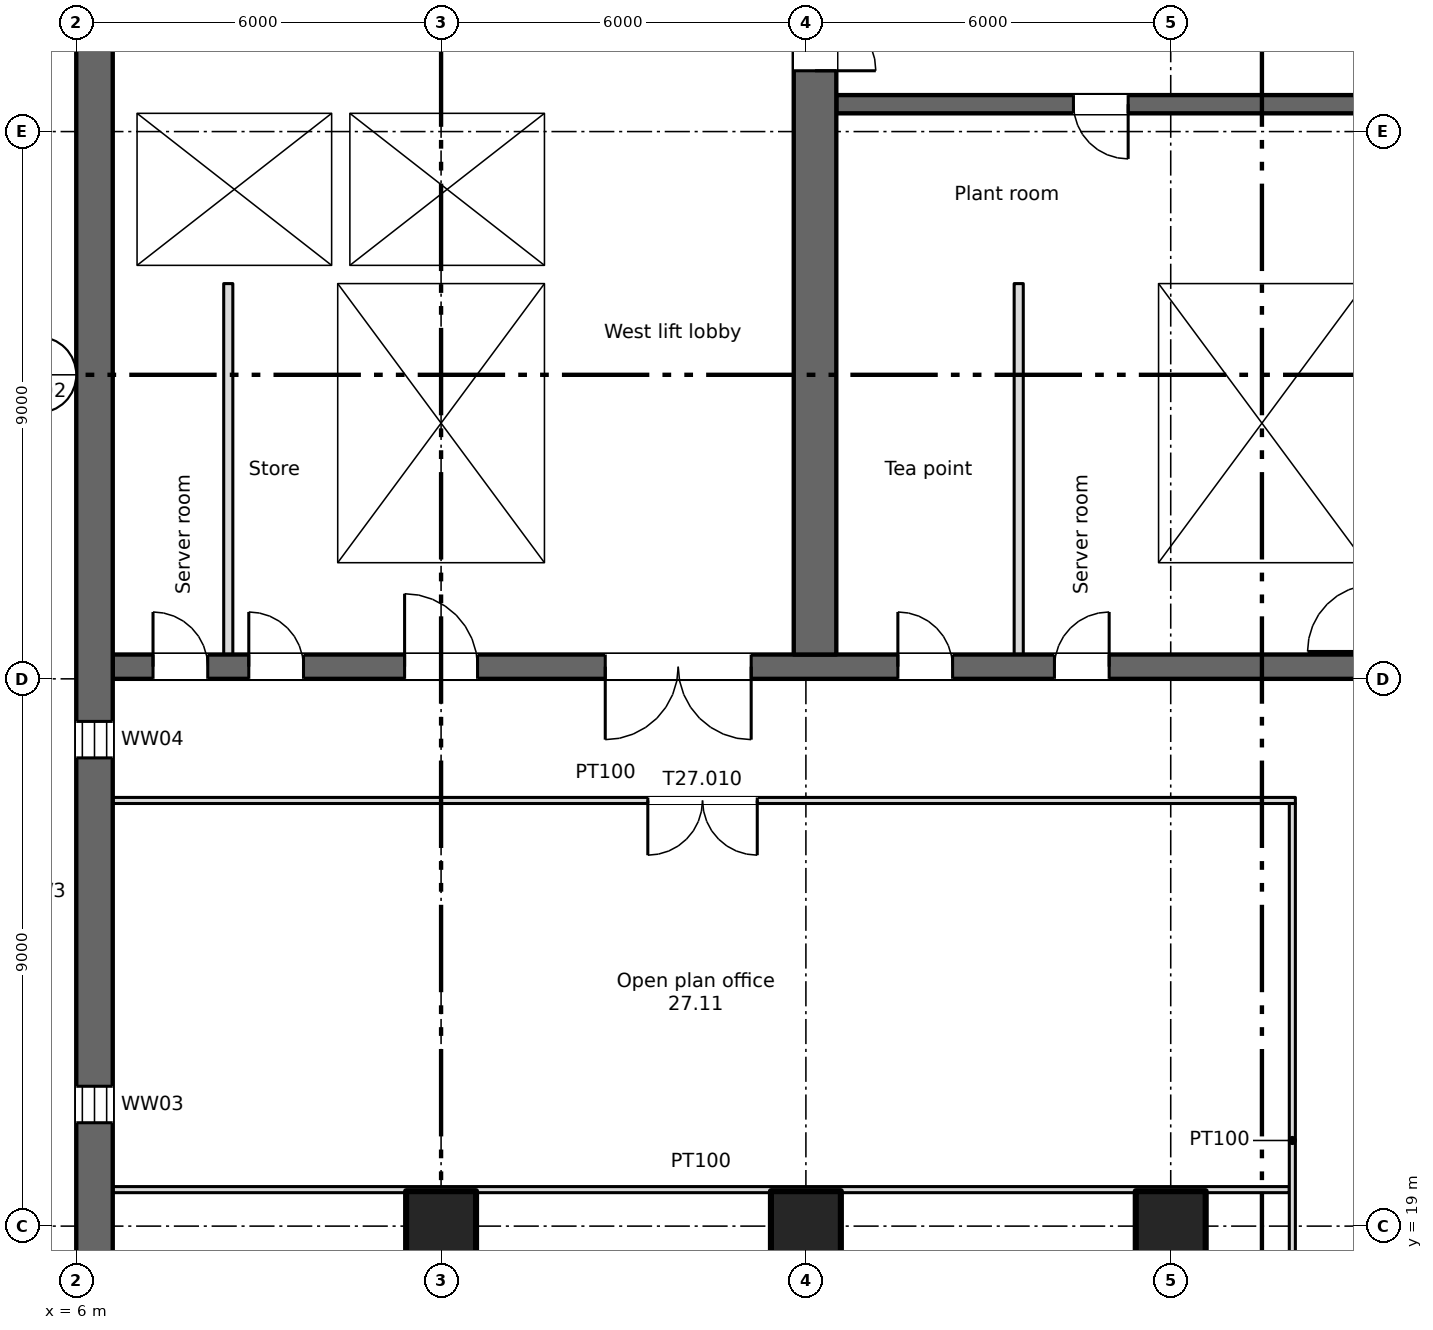
"""IFC4 building model, lengths in metres.
Left out: names, types, materials, properties, quantities, classifications, styles, units other than length and angle.
Written with IfcOpenShell. Run it as: python <this file> out.ifc"""

import sys

from ifc_helpers import new_model, si_unit, direction, frame, frame_2d, origin, origin_2d, place, context, subcontext, project, spatial, rectangle, extrude, element, fill, save


model = new_model("IFC4")
c1 = context("Model", 3, precision=1e-05, world=origin(), true_north=direction((0.0, 1.0)))
c2 = subcontext(c1, "Body", "Model", "MODEL_VIEW")
j1 = project(units=[si_unit("LENGTHUNIT", "METRE"), si_unit("PLANEANGLEUNIT", "RADIAN")], contexts=[c1])
p1 = place(None, origin())
s1 = spatial("IfcSite", under=j1, at=p1, CompositionType="ELEMENT")
p2 = place(p1, origin())
s2 = spatial("IfcBuilding", under=s1, at=p2, CompositionType="ELEMENT")
p3 = place(p2, frame((0.0, 0.0, 185.5)))
s3 = spatial("IfcBuildingStorey", under=s2, at=p3, CompositionType="ELEMENT", Elevation=185.5)
for number, where, z_axis, x_axis in (
    (1, (12.0, 19.0, 0.0), (0.0, 0.0, 1.0), (1.0, 0.0, 0.0)),
    (2, (18.0, 19.0, 0.0), (0.0, 0.0, 1.0), (1.0, 0.0, 0.0)),
    (3, (24.0, 19.0, 0.0), (0.0, 0.0, 1.0), (1.0, 0.0, 0.0)),
):
    element("IfcColumn", number, at=place(p3, frame(where, z_axis=z_axis, x_axis=x_axis)), inside=s3, PredefinedType="COLUMN", context=c2, shape_type="SweptSolid", body=[
        extrude(rectangle(XDim=1.15, YDim=1.15, at=origin_2d()), origin(), (0.0, 0.0, 1.0), 3.35),
    ])
p4 = place(p3, frame((6.3, 7.5, 0.0), z_axis=(0.0, 0.0, 1.0), x_axis=(0.0, 1.0, 0.0)))
e4 = element("IfcWall", 4, at=p4, inside=s3, PredefinedType="SHEAR", context=c2, shape_type="SweptSolid", body=[
    extrude(rectangle(XDim=34.0, YDim=0.6, at=frame_2d((17.0, 0.0))), origin(), (0.0, 0.0, 1.0), 3.35),
])
p5 = place(p4, frame((1.2, 0.0, 0.6)))
e5 = element("IfcOpeningElement", 5, at=p5, cuts=e4, PredefinedType="OPENING", context=c2, shape_type="SweptSolid", body=[
    extrude(rectangle(XDim=0.6, YDim=2.4, at=frame_2d((0.3, 1.2))), frame((0.0, 0.31, 0.0), z_axis=(0.0, -1.0, 0.0), x_axis=(1.0, 0.0, 0.0)), (0.0, 0.0, 1.0), 0.62),
])
p6 = place(p4, frame((7.2, 0.0, 0.6)))
e6 = element("IfcOpeningElement", 6, at=p6, cuts=e4, PredefinedType="OPENING", context=c2, shape_type="SweptSolid", body=[
    extrude(rectangle(XDim=0.6, YDim=2.4, at=frame_2d((0.3, 1.2))), frame((0.0, 0.31, 0.0), z_axis=(0.0, -1.0, 0.0), x_axis=(1.0, 0.0, 0.0)), (0.0, 0.0, 1.0), 0.62),
])
p7 = place(p4, frame((13.2, 0.0, 0.6)))
e7 = element("IfcOpeningElement", 7, at=p7, cuts=e4, PredefinedType="OPENING", context=c2, shape_type="SweptSolid", body=[
    extrude(rectangle(XDim=0.6, YDim=2.4, at=frame_2d((0.3, 1.2))), frame((0.0, 0.31, 0.0), z_axis=(0.0, -1.0, 0.0), x_axis=(1.0, 0.0, 0.0)), (0.0, 0.0, 1.0), 0.62),
])
p8 = place(p4, frame((19.2, 0.0, 0.6)))
e8 = element("IfcOpeningElement", 8, at=p8, cuts=e4, PredefinedType="OPENING", context=c2, shape_type="SweptSolid", body=[
    extrude(rectangle(XDim=0.6, YDim=2.4, at=frame_2d((0.3, 1.2))), frame((0.0, 0.31, 0.0), z_axis=(0.0, -1.0, 0.0), x_axis=(1.0, 0.0, 0.0)), (0.0, 0.0, 1.0), 0.62),
])
p9 = place(p3, frame((6.6, 28.2, 0.0), z_axis=(0.0, 0.0, 1.0), x_axis=(1.0, 0.0, 0.0)))
e9 = element("IfcWall", 9, at=p9, inside=s3, PredefinedType="SHEAR", context=c2, shape_type="SweptSolid", body=[
    extrude(rectangle(XDim=57.9, YDim=0.4, at=frame_2d((28.95, 0.0))), origin(), (0.0, 0.0, 1.0), 3.35),
])
p10 = place(p9, frame((12.913, 0.0, 0.0)))
e10 = element("IfcOpeningElement", 10, at=p10, cuts=e9, PredefinedType="OPENING", context=c2, shape_type="SweptSolid", body=[
    extrude(rectangle(XDim=0.9, YDim=2.1, at=frame_2d((0.45, 1.05))), frame((0.0, 0.21, 0.0), z_axis=(0.0, -1.0, 0.0), x_axis=(1.0, 0.0, 0.0)), (0.0, 0.0, 1.0), 0.42),
])
p11 = place(p9, frame((15.488, 0.0, 0.0)))
e11 = element("IfcOpeningElement", 11, at=p11, cuts=e9, PredefinedType="OPENING", context=c2, shape_type="SweptSolid", body=[
    extrude(rectangle(XDim=0.9, YDim=2.1, at=frame_2d((0.45, 1.05))), frame((0.0, 0.21, 0.0), z_axis=(0.0, -1.0, 0.0), x_axis=(1.0, 0.0, 0.0)), (0.0, 0.0, 1.0), 0.42),
])
p12 = place(p9, frame((48.413, 0.0, 0.0)))
e12 = element("IfcOpeningElement", 12, at=p12, cuts=e9, PredefinedType="OPENING", context=c2, shape_type="SweptSolid", body=[
    extrude(rectangle(XDim=0.9, YDim=2.1, at=frame_2d((0.45, 1.05))), frame((0.0, 0.21, 0.0), z_axis=(0.0, -1.0, 0.0), x_axis=(1.0, 0.0, 0.0)), (0.0, 0.0, 1.0), 0.42),
])
p13 = place(p9, frame((50.988, 0.0, 0.0)))
e13 = element("IfcOpeningElement", 13, at=p13, cuts=e9, PredefinedType="OPENING", context=c2, shape_type="SweptSolid", body=[
    extrude(rectangle(XDim=0.9, YDim=2.1, at=frame_2d((0.45, 1.05))), frame((0.0, 0.21, 0.0), z_axis=(0.0, -1.0, 0.0), x_axis=(1.0, 0.0, 0.0)), (0.0, 0.0, 1.0), 0.42),
])
p14 = place(p9, frame((0.663, 0.0, 0.0)))
e14 = element("IfcOpeningElement", 14, at=p14, cuts=e9, PredefinedType="OPENING", context=c2, shape_type="SweptSolid", body=[
    extrude(rectangle(XDim=0.9, YDim=2.1, at=frame_2d((0.45, 1.05))), frame((0.0, 0.21, 0.0), z_axis=(0.0, -1.0, 0.0), x_axis=(1.0, 0.0, 0.0)), (0.0, 0.0, 1.0), 0.42),
])
p15 = place(p9, frame((2.238, 0.0, 0.0)))
e15 = element("IfcOpeningElement", 15, at=p15, cuts=e9, PredefinedType="OPENING", context=c2, shape_type="SweptSolid", body=[
    extrude(rectangle(XDim=0.9, YDim=2.1, at=frame_2d((0.45, 1.05))), frame((0.0, 0.21, 0.0), z_axis=(0.0, -1.0, 0.0), x_axis=(1.0, 0.0, 0.0)), (0.0, 0.0, 1.0), 0.42),
])
p16 = place(p9, frame((4.8, 0.0, 0.0)))
e16 = element("IfcOpeningElement", 16, at=p16, cuts=e9, PredefinedType="OPENING", context=c2, shape_type="SweptSolid", body=[
    extrude(rectangle(XDim=1.2, YDim=2.1, at=frame_2d((0.6, 1.05))), frame((0.0, 0.21, 0.0), z_axis=(0.0, -1.0, 0.0), x_axis=(1.0, 0.0, 0.0)), (0.0, 0.0, 1.0), 0.42),
])
p17 = place(p9, frame((31.8, 0.0, 0.0)))
e17 = element("IfcOpeningElement", 17, at=p17, cuts=e9, PredefinedType="OPENING", context=c2, shape_type="SweptSolid", body=[
    extrude(rectangle(XDim=1.2, YDim=2.1, at=frame_2d((0.6, 1.05))), frame((0.0, 0.21, 0.0), z_axis=(0.0, -1.0, 0.0), x_axis=(1.0, 0.0, 0.0)), (0.0, 0.0, 1.0), 0.42),
])
p18 = place(p9, frame((55.3, 0.0, 0.0)))
e18 = element("IfcOpeningElement", 18, at=p18, cuts=e9, PredefinedType="OPENING", context=c2, shape_type="SweptSolid", body=[
    extrude(rectangle(XDim=1.2, YDim=2.1, at=frame_2d((0.6, 1.05))), frame((0.0, 0.21, 0.0), z_axis=(0.0, -1.0, 0.0), x_axis=(1.0, 0.0, 0.0)), (0.0, 0.0, 1.0), 0.42),
])
p19 = place(p9, frame((21.8, 0.0, 0.0)))
e19 = element("IfcOpeningElement", 19, at=p19, cuts=e9, PredefinedType="OPENING", context=c2, shape_type="SweptSolid", body=[
    extrude(rectangle(XDim=1.2, YDim=2.1, at=frame_2d((0.6, 1.05))), frame((0.0, 0.21, 0.0), z_axis=(0.0, -1.0, 0.0), x_axis=(1.0, 0.0, 0.0)), (0.0, 0.0, 1.0), 0.42),
])
p20 = place(p9, frame((41.8, 0.0, 0.0)))
e20 = element("IfcOpeningElement", 20, at=p20, cuts=e9, PredefinedType="OPENING", context=c2, shape_type="SweptSolid", body=[
    extrude(rectangle(XDim=1.2, YDim=2.1, at=frame_2d((0.6, 1.05))), frame((0.0, 0.21, 0.0), z_axis=(0.0, -1.0, 0.0), x_axis=(1.0, 0.0, 0.0)), (0.0, 0.0, 1.0), 0.42),
])
p21 = place(p9, frame((24.95, 0.0, 0.0)))
e21 = element("IfcOpeningElement", 21, at=p21, cuts=e9, PredefinedType="OPENING", context=c2, shape_type="SweptSolid", body=[
    extrude(rectangle(XDim=2.4, YDim=2.1, at=frame_2d((1.2, 1.05))), frame((0.0, 0.21, 0.0), z_axis=(0.0, -1.0, 0.0), x_axis=(1.0, 0.0, 0.0)), (0.0, 0.0, 1.0), 0.42),
])
p22 = place(p9, frame((37.45, 0.0, 0.0)))
e22 = element("IfcOpeningElement", 22, at=p22, cuts=e9, PredefinedType="OPENING", context=c2, shape_type="SweptSolid", body=[
    extrude(rectangle(XDim=2.4, YDim=2.1, at=frame_2d((1.2, 1.05))), frame((0.0, 0.21, 0.0), z_axis=(0.0, -1.0, 0.0), x_axis=(1.0, 0.0, 0.0)), (0.0, 0.0, 1.0), 0.42),
])
p23 = place(p9, frame((8.1, 0.0, 0.0)))
e23 = element("IfcOpeningElement", 23, at=p23, cuts=e9, PredefinedType="OPENING", context=c2, shape_type="SweptSolid", body=[
    extrude(rectangle(XDim=2.4, YDim=2.1, at=frame_2d((1.2, 1.05))), frame((0.0, 0.21, 0.0), z_axis=(0.0, -1.0, 0.0), x_axis=(1.0, 0.0, 0.0)), (0.0, 0.0, 1.0), 0.42),
])
p24 = place(p9, frame((28.95, 0.0, 0.0)))
e24 = element("IfcOpeningElement", 24, at=p24, cuts=e9, PredefinedType="OPENING", context=c2, shape_type="SweptSolid", body=[
    extrude(rectangle(XDim=0.9, YDim=2.1, at=frame_2d((0.45, 1.05))), frame((0.0, 0.21, 0.0), z_axis=(0.0, -1.0, 0.0), x_axis=(1.0, 0.0, 0.0)), (0.0, 0.0, 1.0), 0.42),
])
p25 = place(p9, frame((34.95, 0.0, 0.0)))
e25 = element("IfcOpeningElement", 25, at=p25, cuts=e9, PredefinedType="OPENING", context=c2, shape_type="SweptSolid", body=[
    extrude(rectangle(XDim=0.9, YDim=2.1, at=frame_2d((0.45, 1.05))), frame((0.0, 0.21, 0.0), z_axis=(0.0, -1.0, 0.0), x_axis=(1.0, 0.0, 0.0)), (0.0, 0.0, 1.0), 0.42),
])
p26 = place(p3, frame((6.8, 28.4, 0.0), z_axis=(0.0, 0.0, 1.0), x_axis=(0.0, 1.0, 0.0)))
e26 = element("IfcWall", 26, at=p26, inside=s3, PredefinedType="SHEAR", context=c2, shape_type="SweptSolid", body=[
    extrude(rectangle(XDim=12.85, YDim=0.4, at=frame_2d((6.425, 0.0))), origin(), (0.0, 0.0, 1.0), 3.35),
])
p27 = place(p3, frame((18.15, 28.4, 0.0), z_axis=(0.0, 0.0, 1.0), x_axis=(0.0, 1.0, 0.0)))
e27 = element("IfcWall", 27, at=p27, inside=s3, PredefinedType="SHEAR", context=c2, shape_type="SweptSolid", body=[
    extrude(rectangle(XDim=16.9, YDim=0.7, at=frame_2d((8.45, 0.0))), origin(), (0.0, 0.0, 1.0), 3.35),
])
p28 = place(p27, frame((9.6, 0.0, 0.0)))
e28 = element("IfcOpeningElement", 28, at=p28, cuts=e27, PredefinedType="OPENING", context=c2, shape_type="SweptSolid", body=[
    extrude(rectangle(XDim=2.0, YDim=2.1, at=frame_2d((1.0, 1.05))), frame((0.0, 0.36, 0.0), z_axis=(0.0, -1.0, 0.0), x_axis=(1.0, 0.0, 0.0)), (0.0, 0.0, 1.0), 0.72),
])
p29 = place(p27, frame((15.4, 0.0, 0.0)))
e29 = element("IfcOpeningElement", 29, at=p29, cuts=e27, PredefinedType="OPENING", context=c2, shape_type="SweptSolid", body=[
    extrude(rectangle(XDim=1.2, YDim=2.1, at=frame_2d((0.6, 1.05))), frame((0.0, 0.36, 0.0), z_axis=(0.0, -1.0, 0.0), x_axis=(1.0, 0.0, 0.0)), (0.0, 0.0, 1.0), 0.72),
])
for number, where, z_axis, x_axis in (
    (30, (10.15, 28.4, 0.0), (0.0, 0.0, 1.0), (0.0, 1.0, 0.0)),
    (31, (13.85, 28.4, 0.0), (0.0, 0.0, 1.0), (0.0, 1.0, 0.0)),
    (32, (23.65, 28.4, 0.0), (0.0, 0.0, 1.0), (0.0, 1.0, 0.0)),
):
    element("IfcWall", number, at=place(p3, frame(where, z_axis=z_axis, x_axis=x_axis)), inside=s3, PredefinedType="SHEAR", context=c2, shape_type="SweptSolid", body=[
        extrude(rectangle(XDim=6.1, YDim=0.3, at=frame_2d((3.05, 0.0))), origin(), (0.0, 0.0, 1.0), 3.35),
    ])
p30 = place(p3, frame((7.0, 34.65, 0.0), z_axis=(0.0, 0.0, 1.0), x_axis=(1.0, 0.0, 0.0)))
e33 = element("IfcWall", 33, at=p30, inside=s3, PredefinedType="SHEAR", context=c2, shape_type="SweptSolid", body=[
    extrude(rectangle(XDim=7.0, YDim=0.3, at=frame_2d((3.5, 0.0))), origin(), (0.0, 0.0, 1.0), 3.35),
])
p31 = place(p3, frame((18.5, 34.65, 0.0), z_axis=(0.0, 0.0, 1.0), x_axis=(1.0, 0.0, 0.0)))
e34 = element("IfcWall", 34, at=p31, inside=s3, PredefinedType="SHEAR", context=c2, shape_type="SweptSolid", body=[
    extrude(rectangle(XDim=12.2, YDim=0.3, at=frame_2d((6.1, 0.0))), origin(), (0.0, 0.0, 1.0), 3.35),
])
p32 = place(p31, frame((9.8, 0.0, 0.0)))
e35 = element("IfcOpeningElement", 35, at=p32, cuts=e34, PredefinedType="OPENING", context=c2, shape_type="SweptSolid", body=[
    extrude(rectangle(XDim=1.1, YDim=2.1, at=frame_2d((0.55, 1.05))), frame((0.0, 0.16, 0.0), z_axis=(0.0, -1.0, 0.0), x_axis=(1.0, 0.0, 0.0)), (0.0, 0.0, 1.0), 0.32),
])
p33 = place(p3, frame((7.0, 37.45, 0.0), z_axis=(0.0, 0.0, 1.0), x_axis=(1.0, 0.0, 0.0)))
e36 = element("IfcWall", 36, at=p33, inside=s3, PredefinedType="SHEAR", context=c2, shape_type="SweptSolid", body=[
    extrude(rectangle(XDim=7.0, YDim=0.3, at=frame_2d((3.5, 0.0))), origin(), (0.0, 0.0, 1.0), 3.35),
])
p34 = place(p3, frame((30.7, 37.45, 0.0), z_axis=(0.0, 0.0, 1.0), x_axis=(-1.0, 0.0, 0.0)))
e37 = element("IfcWall", 37, at=p34, inside=s3, PredefinedType="SHEAR", context=c2, shape_type="SweptSolid", body=[
    extrude(rectangle(XDim=12.2, YDim=0.3, at=frame_2d((6.1, 0.0))), origin(), (0.0, 0.0, 1.0), 3.35),
])
p35 = place(p34, frame((7.4, 0.0, 0.0)))
e38 = element("IfcOpeningElement", 38, at=p35, cuts=e37, PredefinedType="OPENING", context=c2, shape_type="SweptSolid", body=[
    extrude(rectangle(XDim=0.9, YDim=2.1, at=frame_2d((0.45, 1.05))), frame((0.0, 0.16, 0.0), z_axis=(0.0, -1.0, 0.0), x_axis=(1.0, 0.0, 0.0)), (0.0, 0.0, 1.0), 0.32),
])
for number, where, z_axis, x_axis in (
    (39, (13.85, 34.8, 0.0), (0.0, 0.0, 1.0), (0.0, 1.0, 0.0)),
    (40, (10.35, 34.8, 0.0), (0.0, 0.0, 1.0), (0.0, 1.0, 0.0)),
):
    element("IfcWall", number, at=place(p3, frame(where, z_axis=z_axis, x_axis=x_axis)), inside=s3, PredefinedType="SHEAR", context=c2, shape_type="SweptSolid", body=[
        extrude(rectangle(XDim=2.5, YDim=0.3, at=frame_2d((1.25, 0.0))), origin(), (0.0, 0.0, 1.0), 3.35),
    ])
for number, where, z_axis, x_axis in (
    (41, (21.5, 28.4, 0.0), (0.0, 0.0, 1.0), (0.0, 1.0, 0.0)),
    (42, (8.5, 28.4, 0.0), (0.0, 0.0, 1.0), (0.0, 1.0, 0.0)),
):
    element("IfcWall", number, at=place(p3, frame(where, z_axis=z_axis, x_axis=x_axis)), inside=s3, PredefinedType="PARTITIONING", context=c2, shape_type="SweptSolid", body=[
        extrude(rectangle(XDim=6.1, YDim=0.15, at=frame_2d((3.05, 0.0))), origin(), (0.0, 0.0, 1.0), 3.35),
    ])
p36 = place(p3, frame((6.6, 19.6, 0.0), z_axis=(0.0, 0.0, 1.0), x_axis=(1.0, 0.0, 0.0)))
e43 = element("IfcWall", 43, at=p36, inside=s3, PredefinedType="PARTITIONING", context=c2, shape_type="SweptSolid", body=[
    extrude(rectangle(XDim=19.35, YDim=0.1, at=frame_2d((9.675, 0.0))), origin(), (0.0, 0.0, 1.0), 3.35),
])
p37 = place(p3, frame((6.6, 26.0, 0.0), z_axis=(0.0, 0.0, 1.0), x_axis=(1.0, 0.0, 0.0)))
e44 = element("IfcWall", 44, at=p37, inside=s3, PredefinedType="PARTITIONING", context=c2, shape_type="SweptSolid", body=[
    extrude(rectangle(XDim=19.45, YDim=0.1, at=frame_2d((9.725, 0.0))), origin(), (0.0, 0.0, 1.0), 3.35),
])
p38 = place(p37, frame((8.8, 0.0, 0.0)))
e45 = element("IfcOpeningElement", 45, at=p38, cuts=e44, PredefinedType="OPENING", context=c2, shape_type="SweptSolid", body=[
    extrude(rectangle(XDim=1.8, YDim=2.1, at=frame_2d((0.9, 1.05))), frame((0.0, 0.06, 0.0), z_axis=(0.0, -1.0, 0.0), x_axis=(1.0, 0.0, 0.0)), (0.0, 0.0, 1.0), 0.12),
])
p39 = place(p3, frame((26.0, 12.65, 0.0), z_axis=(0.0, 0.0, 1.0), x_axis=(0.0, 1.0, 0.0)))
e46 = element("IfcWall", 46, at=p39, inside=s3, PredefinedType="PARTITIONING", context=c2, shape_type="SweptSolid", body=[
    extrude(rectangle(XDim=13.3, YDim=0.1, at=frame_2d((6.65, 0.0))), origin(), (0.0, 0.0, 1.0), 3.35),
])
p40 = place(p7, origin())
e47 = element("IfcWindow", 47, at=p40, inside=s3, PartitioningType="SINGLE_PANEL", PredefinedType="WINDOW", context=c2, shape_type="SweptSolid", body=[
    extrude(rectangle(XDim=0.6, YDim=2.4, at=frame_2d((0.3, 1.2))), frame((0.0, 0.03, 0.0), z_axis=(0.0, -1.0, 0.0), x_axis=(1.0, 0.0, 0.0)), (0.0, 0.0, 1.0), 0.06),
])
fill(e7, e47)
p41 = place(p8, origin())
e48 = element("IfcWindow", 48, at=p41, inside=s3, PartitioningType="SINGLE_PANEL", PredefinedType="WINDOW", context=c2, shape_type="SweptSolid", body=[
    extrude(rectangle(XDim=0.6, YDim=2.4, at=frame_2d((0.3, 1.2))), frame((0.0, 0.03, 0.0), z_axis=(0.0, -1.0, 0.0), x_axis=(1.0, 0.0, 0.0)), (0.0, 0.0, 1.0), 0.06),
])
fill(e8, e48)
p42 = place(p10, origin())
e49 = element("IfcDoor", 49, at=p42, inside=s3, OperationType="SINGLE_SWING_LEFT", PredefinedType="DOOR", context=c2, shape_type="SweptSolid", body=[
    extrude(rectangle(XDim=0.9, YDim=2.1, at=frame_2d((0.45, 1.05))), frame((0.0, 0.025, 0.0), z_axis=(0.0, -1.0, 0.0), x_axis=(1.0, 0.0, 0.0)), (0.0, 0.0, 1.0), 0.05),
])
fill(e10, e49)
p43 = place(p11, origin())
e50 = element("IfcDoor", 50, at=p43, inside=s3, OperationType="SINGLE_SWING_RIGHT", PredefinedType="DOOR", context=c2, shape_type="SweptSolid", body=[
    extrude(rectangle(XDim=0.9, YDim=2.1, at=frame_2d((0.45, 1.05))), frame((0.0, 0.025, 0.0), z_axis=(0.0, -1.0, 0.0), x_axis=(1.0, 0.0, 0.0)), (0.0, 0.0, 1.0), 0.05),
])
fill(e11, e50)
p44 = place(p14, origin())
e51 = element("IfcDoor", 51, at=p44, inside=s3, OperationType="SINGLE_SWING_LEFT", PredefinedType="DOOR", context=c2, shape_type="SweptSolid", body=[
    extrude(rectangle(XDim=0.9, YDim=2.1, at=frame_2d((0.45, 1.05))), frame((0.0, 0.025, 0.0), z_axis=(0.0, -1.0, 0.0), x_axis=(1.0, 0.0, 0.0)), (0.0, 0.0, 1.0), 0.05),
])
fill(e14, e51)
p45 = place(p15, origin())
e52 = element("IfcDoor", 52, at=p45, inside=s3, OperationType="SINGLE_SWING_LEFT", PredefinedType="DOOR", context=c2, shape_type="SweptSolid", body=[
    extrude(rectangle(XDim=0.9, YDim=2.1, at=frame_2d((0.45, 1.05))), frame((0.0, 0.025, 0.0), z_axis=(0.0, -1.0, 0.0), x_axis=(1.0, 0.0, 0.0)), (0.0, 0.0, 1.0), 0.05),
])
fill(e15, e52)
p46 = place(p35, origin())
e53 = element("IfcDoor", 53, at=p46, inside=s3, OperationType="SINGLE_SWING_LEFT", PredefinedType="DOOR", context=c2, shape_type="SweptSolid", body=[
    extrude(rectangle(XDim=0.9, YDim=2.1, at=frame_2d((0.45, 1.05))), frame((0.0, 0.025, 0.0), z_axis=(0.0, -1.0, 0.0), x_axis=(1.0, 0.0, 0.0)), (0.0, 0.0, 1.0), 0.05),
])
fill(e38, e53)
p47 = place(p16, origin())
e54 = element("IfcDoor", 54, at=p47, inside=s3, OperationType="SINGLE_SWING_LEFT", PredefinedType="DOOR", context=c2, shape_type="SweptSolid", body=[
    extrude(rectangle(XDim=1.2, YDim=2.1, at=frame_2d((0.6, 1.05))), frame((0.0, 0.025, 0.0), z_axis=(0.0, -1.0, 0.0), x_axis=(1.0, 0.0, 0.0)), (0.0, 0.0, 1.0), 0.05),
])
fill(e16, e54)
p48 = place(p23, origin())
e55 = element("IfcDoor", 55, at=p48, inside=s3, OperationType="DOUBLE_DOOR_SINGLE_SWING", PredefinedType="DOOR", context=c2, shape_type="SweptSolid", body=[
    extrude(rectangle(XDim=2.4, YDim=2.1, at=frame_2d((1.2, 1.05))), frame((0.0, 0.025, 0.0), z_axis=(0.0, -1.0, 0.0), x_axis=(1.0, 0.0, 0.0)), (0.0, 0.0, 1.0), 0.05),
])
fill(e23, e55)
p49 = place(p28, origin())
e56 = element("IfcDoor", 56, at=p49, inside=s3, OperationType="DOUBLE_DOOR_SINGLE_SWING", PredefinedType="DOOR", context=c2, shape_type="SweptSolid", body=[
    extrude(rectangle(XDim=2.0, YDim=2.1, at=frame_2d((1.0, 1.05))), frame((0.0, 0.025, 0.0), z_axis=(0.0, -1.0, 0.0), x_axis=(1.0, 0.0, 0.0)), (0.0, 0.0, 1.0), 0.05),
])
fill(e28, e56)
p50 = place(p38, origin())
e57 = element("IfcDoor", 57, at=p50, inside=s3, OperationType="DOUBLE_DOOR_SINGLE_SWING", PredefinedType="DOOR", context=c2, shape_type="SweptSolid", body=[
    extrude(rectangle(XDim=1.8, YDim=2.1, at=frame_2d((0.9, 1.05))), frame((0.0, 0.025, 0.0), z_axis=(0.0, -1.0, 0.0), x_axis=(1.0, 0.0, 0.0)), (0.0, 0.0, 1.0), 0.05),
])
fill(e45, e57)
save(model, sys.argv[1])
